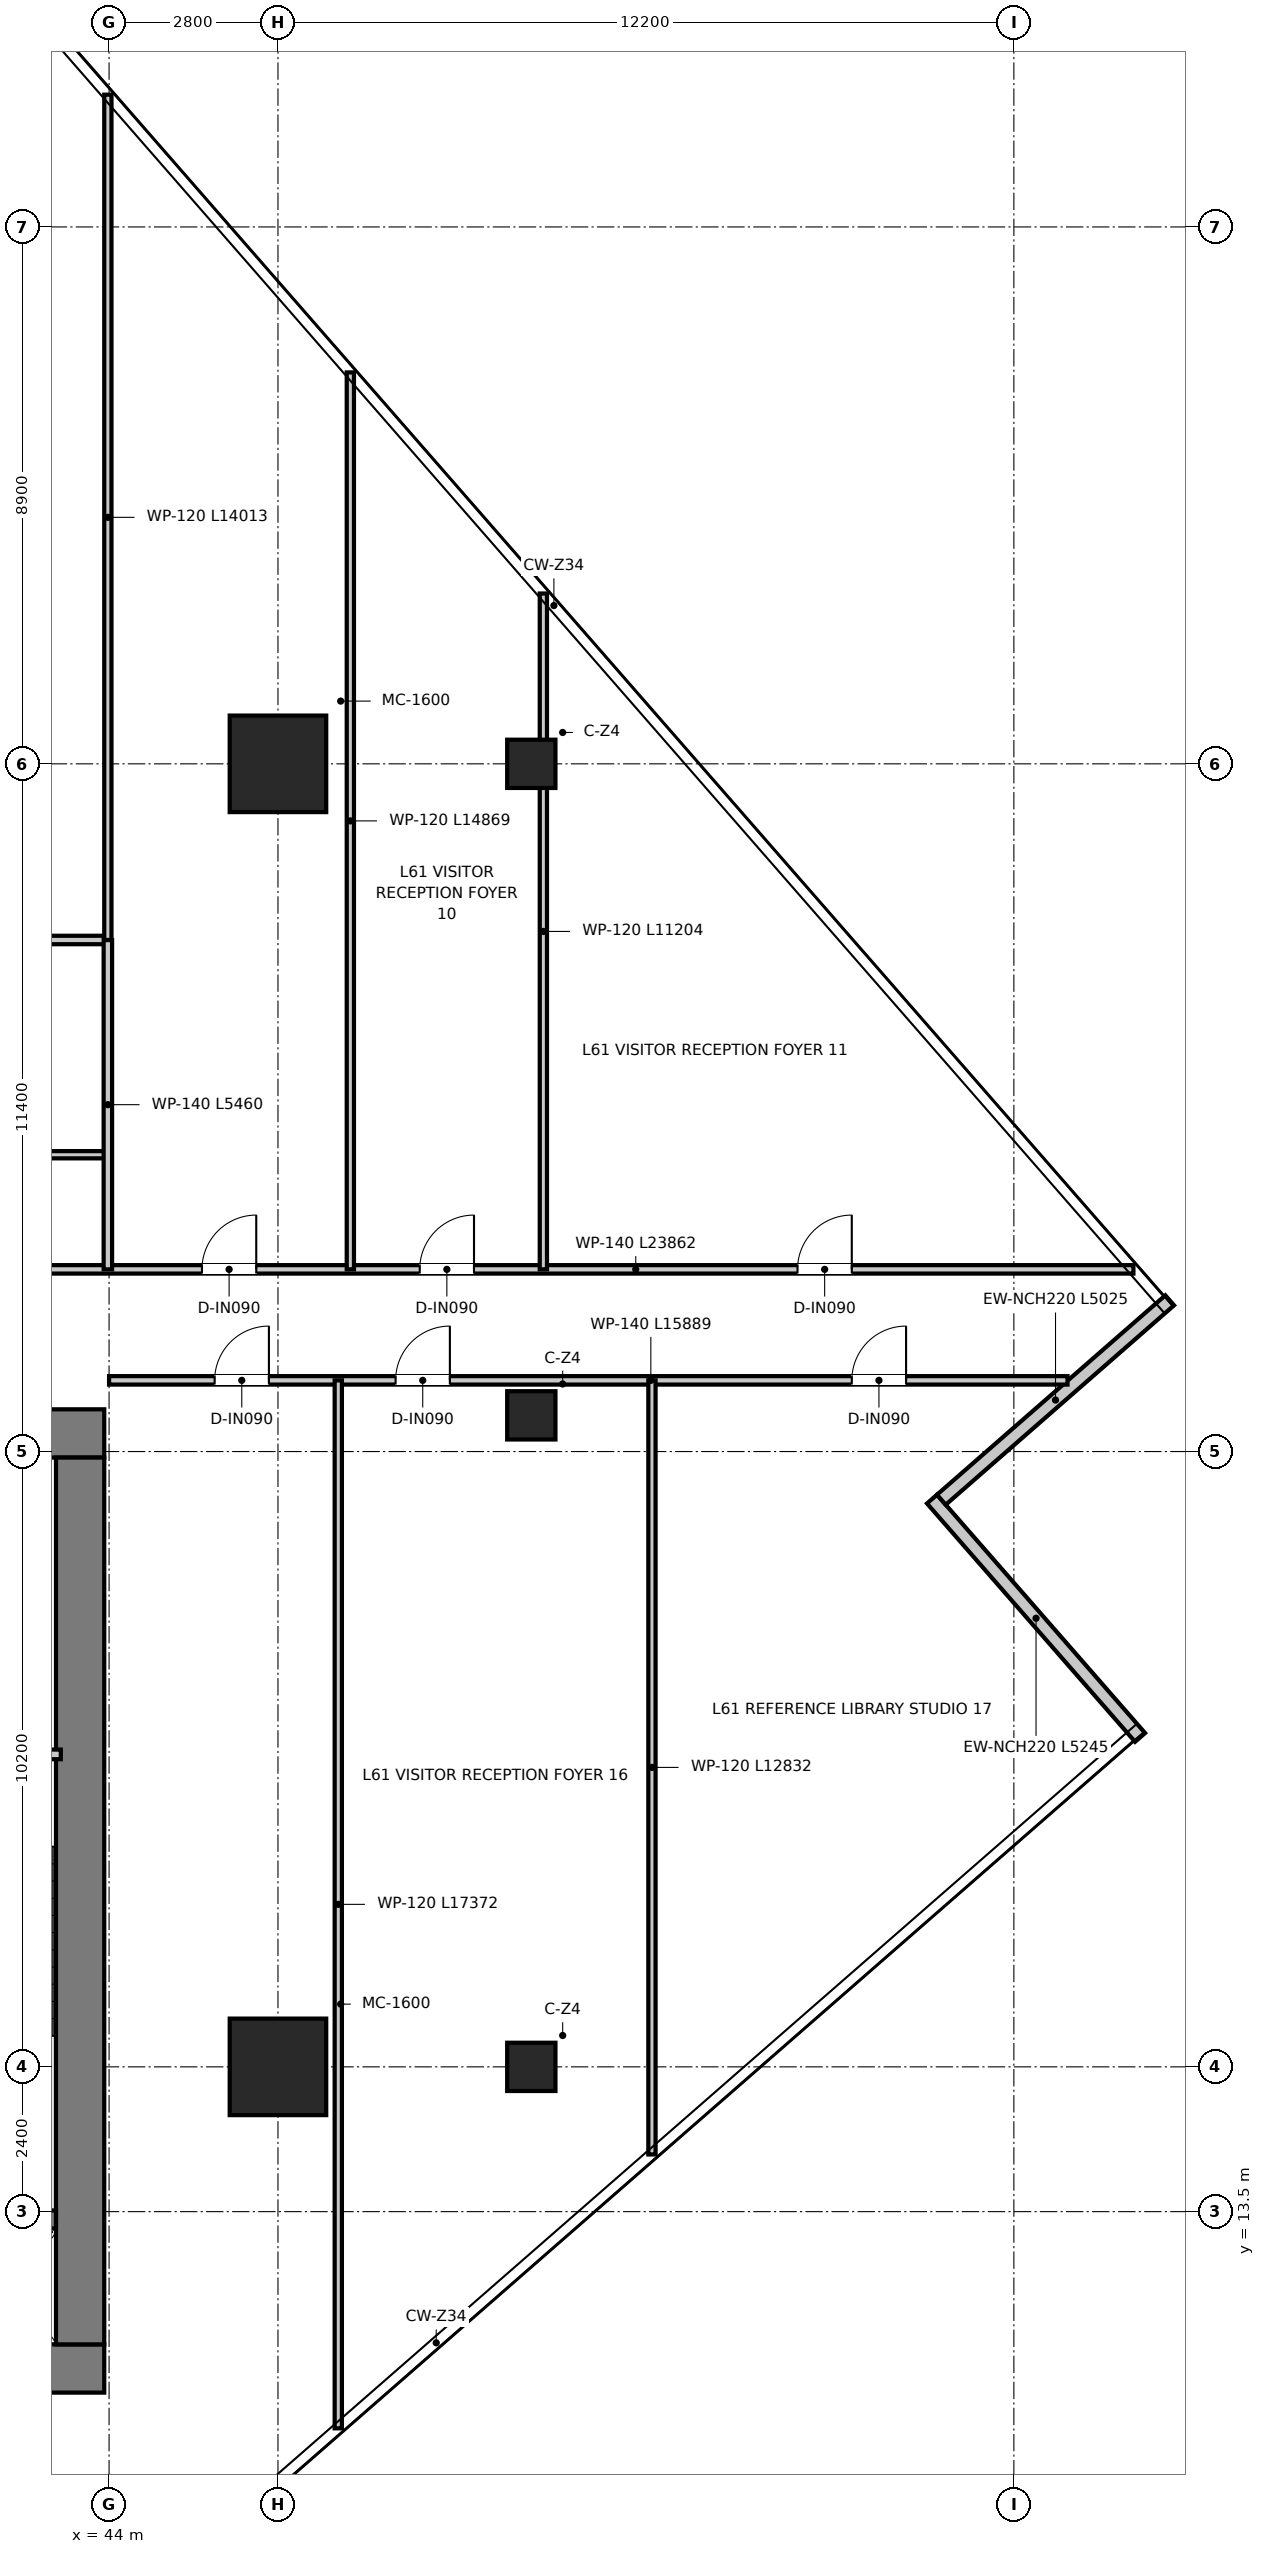
"""IFC4 building model, lengths in metres.
Left out: names, types, materials, properties, quantities, classifications, styles, units other than length and angle.
Written with IfcOpenShell. Run it as: python <this file> out.ifc"""

import sys

from ifc_helpers import new_model, si_unit, direction, frame, frame_2d, origin, origin_2d, place, context, subcontext, project, spatial, rectangle, extrude, source, transform, mapped, element, fill, save


model = new_model("IFC4")
c1 = context("Model", 3, precision=1e-05, world=origin(), true_north=direction((0.0, 1.0)))
c2 = subcontext(c1, "Body", "Model", "MODEL_VIEW")
j1 = project(units=[si_unit("LENGTHUNIT", "METRE"), si_unit("PLANEANGLEUNIT", "RADIAN")], contexts=[c1])
p1 = place(None, origin())
s1 = spatial("IfcSite", under=j1, at=p1, CompositionType="ELEMENT")
p2 = place(p1, origin())
s2 = spatial("IfcBuilding", under=s1, at=p2, CompositionType="ELEMENT")
p3 = place(p2, frame((0.0, 0.0, 250.75)))
s3 = spatial("IfcBuildingStorey", under=s2, at=p3, CompositionType="ELEMENT", Elevation=250.75)
p4 = place(p3, frame((28.08, 10.9, 0.0), z_axis=(0.0, 0.0, 1.0), x_axis=(1.0, 0.0, 0.0)))
e1 = element("IfcWall", 1, at=p4, inside=s3, PredefinedType="SHEAR", context=c2, shape_type="SweptSolid", body=[
    extrude(rectangle(XDim=15.84, YDim=0.8, at=frame_2d((7.92, 0.0))), origin(), (0.0, 0.0, 1.0), 3.95),
])
p5 = place(p3, frame((28.08, 26.4, 0.0), z_axis=(0.0, 0.0, 1.0), x_axis=(1.0, 0.0, 0.0)))
e2 = element("IfcWall", 2, at=p5, inside=s3, PredefinedType="SHEAR", context=c2, shape_type="SweptSolid", body=[
    extrude(rectangle(XDim=15.84, YDim=0.8, at=frame_2d((7.92, 0.0))), origin(), (0.0, 0.0, 1.0), 3.95),
])
p6 = place(p5, frame((7.22, 0.0, 0.0)))
e3 = element("IfcOpeningElement", 3, at=p6, cuts=e2, PredefinedType="OPENING", context=c2, shape_type="SweptSolid", body=[
    extrude(rectangle(XDim=1.4, YDim=2.2, at=frame_2d((0.7, 1.1))), frame((0.0, 0.41, 0.0), z_axis=(0.0, -1.0, 0.0), x_axis=(1.0, 0.0, 0.0)), (0.0, 0.0, 1.0), 0.82),
])
p7 = place(p5, frame((1.775, 0.0, 0.0)))
e4 = element("IfcOpeningElement", 4, at=p7, cuts=e2, PredefinedType="OPENING", context=c2, shape_type="SweptSolid", body=[
    extrude(rectangle(XDim=1.05, YDim=2.1, at=frame_2d((0.525, 1.05))), frame((0.0, 0.41, 0.0), z_axis=(0.0, -1.0, 0.0), x_axis=(1.0, 0.0, 0.0)), (0.0, 0.0, 1.0), 0.82),
])
p8 = place(p5, frame((13.015, 0.0, 0.0)))
e5 = element("IfcOpeningElement", 5, at=p8, cuts=e2, PredefinedType="OPENING", context=c2, shape_type="SweptSolid", body=[
    extrude(rectangle(XDim=1.05, YDim=2.1, at=frame_2d((0.525, 1.05))), frame((0.0, 0.41, 0.0), z_axis=(0.0, -1.0, 0.0), x_axis=(1.0, 0.0, 0.0)), (0.0, 0.0, 1.0), 0.82),
])
p9 = place(p3, frame((43.52, 11.3, 0.0), z_axis=(0.0, 0.0, 1.0), x_axis=(0.0, 1.0, 0.0)))
e6 = element("IfcWall", 6, at=p9, inside=s3, PredefinedType="SHEAR", context=c2, shape_type="SweptSolid", body=[
    extrude(rectangle(XDim=14.7, YDim=0.8, at=frame_2d((7.35, 0.0))), origin(), (0.0, 0.0, 1.0), 3.95),
])
p10 = place(p3, frame((40.02, 13.37, 0.0), z_axis=(0.0, 0.0, 1.0), x_axis=(1.0, 0.0, 0.0)))
e7 = element("IfcWall", 7, at=p10, inside=s3, PredefinedType="SHEAR", context=c2, shape_type="SweptSolid", body=[
    extrude(rectangle(XDim=3.1, YDim=0.3, at=frame_2d((1.55, 0.0))), origin(), (0.0, 0.0, 1.0), 3.95),
])
m1 = source(origin(), c2, "Body", "SweptSolid", [
    extrude(rectangle(XDim=1.6, YDim=1.6, at=origin_2d()), origin(), (0.0, 0.0, 1.0), 3.95),
])
for number, where, z_axis, x_axis in (
    (8, (46.8, 15.9, 0.0), (0.0, 0.0, 1.0), (1.0, 0.0, 0.0)),
    (9, (46.8, 37.5, 0.0), (0.0, 0.0, 1.0), (1.0, 0.0, 0.0)),
):
    element("IfcColumn", number, at=place(p3, frame(where, z_axis=z_axis, x_axis=x_axis)), inside=s3, PredefinedType="USERDEFINED", context=c2, shape_type="MappedRepresentation", body=[
        mapped(m1, transform((0.0, 0.0, 0.0), x_axis=(1.0, 0.0, 0.0), y_axis=(0.0, 1.0, 0.0), z_axis=(0.0, 0.0, 1.0), scale=1.0)),
    ])
m2 = source(origin(), c2, "Body", "SweptSolid", [
    extrude(rectangle(XDim=0.8, YDim=0.8, at=origin_2d()), origin(), (0.0, 0.0, 1.0), 3.95),
])
for number, where, z_axis, x_axis in (
    (10, (51.0, 37.5, 0.0), (0.0, 0.0, 1.0), (1.0, 0.0, 0.0)),
    (11, (51.0, 26.7, 0.0), (0.0, 0.0, 1.0), (1.0, 0.0, 0.0)),
    (12, (51.0, 15.9, 0.0), (0.0, 0.0, 1.0), (1.0, 0.0, 0.0)),
):
    element("IfcColumn", number, at=place(p3, frame(where, z_axis=z_axis, x_axis=x_axis)), inside=s3, PredefinedType="COLUMN", context=c2, shape_type="MappedRepresentation", body=[
        mapped(m2, transform((0.0, 0.0, 0.0), x_axis=(1.0, 0.0, 0.0), y_axis=(0.0, 1.0, 0.0), z_axis=(0.0, 0.0, 1.0), scale=1.0)),
    ])
p11 = place(p3, frame((61.092, 21.361, 0.0), z_axis=(0.0, 0.0, 1.0), x_axis=(-0.657710057617, 0.7532711863, 0.0)))
e13 = element("IfcWall", 13, at=p11, inside=s3, PredefinedType="ELEMENTEDWALL", context=c2, shape_type="SweptSolid", body=[
    extrude(rectangle(XDim=5.245, YDim=0.22, at=frame_2d((2.623, 0.0))), origin(), (0.0, 0.0, 1.0), 3.67),
])
p12 = place(p3, frame((57.798, 25.302, 0.0), z_axis=(0.0, 0.0, 1.0), x_axis=(0.753274531518, 0.657706226339, 0.0)))
e14 = element("IfcWall", 14, at=p12, inside=s3, PredefinedType="ELEMENTEDWALL", context=c2, shape_type="SweptSolid", body=[
    extrude(rectangle(XDim=5.025, YDim=0.22, at=frame_2d((2.512, 0.0))), origin(), (0.0, 0.0, 1.0), 3.67),
])
p13 = place(p3, frame((40.04, 21.08, 0.0), z_axis=(0.0, 0.0, 1.0), x_axis=(1.0, 0.0, 0.0)))
e15 = element("IfcWall", 15, at=p13, inside=s3, PredefinedType="PARTITIONING", context=c2, shape_type="SweptSolid", body=[
    extrude(rectangle(XDim=3.16, YDim=0.16, at=frame_2d((1.58, 0.0))), origin(), (0.0, 0.0, 1.0), 3.67),
])
p14 = place(p13, frame((1.055, 0.0, 0.0)))
e16 = element("IfcOpeningElement", 16, at=p14, cuts=e15, PredefinedType="OPENING", context=c2, shape_type="SweptSolid", body=[
    extrude(rectangle(XDim=1.05, YDim=2.1, at=frame_2d((0.525, 1.05))), frame((0.0, 0.09, 0.0), z_axis=(0.0, -1.0, 0.0), x_axis=(1.0, 0.0, 0.0)), (0.0, 0.0, 1.0), 0.18),
])
p15 = place(p3, frame((37.12, 29.12, 0.0), z_axis=(0.0, 0.0, 1.0), x_axis=(1.0, 0.0, 0.0)))
e17 = element("IfcWall", 17, at=p15, inside=s3, PredefinedType="PARTITIONING", context=c2, shape_type="SweptSolid", body=[
    extrude(rectangle(XDim=23.862, YDim=0.14, at=frame_2d((11.931, 0.0))), origin(), (0.0, 0.0, 1.0), 3.03),
])
p16 = place(p15, frame((3.03, 0.0, 0.0)))
e18 = element("IfcOpeningElement", 18, at=p16, cuts=e17, PredefinedType="OPENING", context=c2, shape_type="SweptSolid", body=[
    extrude(rectangle(XDim=0.9, YDim=2.1, at=frame_2d((0.45, 1.05))), frame((0.0, 0.08, 0.0), z_axis=(0.0, -1.0, 0.0), x_axis=(1.0, 0.0, 0.0)), (0.0, 0.0, 1.0), 0.16),
])
p17 = place(p15, frame((8.42, 0.0, 0.0)))
e19 = element("IfcOpeningElement", 19, at=p17, cuts=e17, PredefinedType="OPENING", context=c2, shape_type="SweptSolid", body=[
    extrude(rectangle(XDim=0.9, YDim=2.1, at=frame_2d((0.45, 1.05))), frame((0.0, 0.08, 0.0), z_axis=(0.0, -1.0, 0.0), x_axis=(1.0, 0.0, 0.0)), (0.0, 0.0, 1.0), 0.16),
])
p18 = place(p15, frame((12.03, 0.0, 0.0)))
e20 = element("IfcOpeningElement", 20, at=p18, cuts=e17, PredefinedType="OPENING", context=c2, shape_type="SweptSolid", body=[
    extrude(rectangle(XDim=0.9, YDim=2.1, at=frame_2d((0.45, 1.05))), frame((0.0, 0.08, 0.0), z_axis=(0.0, -1.0, 0.0), x_axis=(1.0, 0.0, 0.0)), (0.0, 0.0, 1.0), 0.16),
])
p19 = place(p15, frame((18.293, 0.0, 0.0)))
e21 = element("IfcOpeningElement", 21, at=p19, cuts=e17, PredefinedType="OPENING", context=c2, shape_type="SweptSolid", body=[
    extrude(rectangle(XDim=0.9, YDim=2.1, at=frame_2d((0.45, 1.05))), frame((0.0, 0.08, 0.0), z_axis=(0.0, -1.0, 0.0), x_axis=(1.0, 0.0, 0.0)), (0.0, 0.0, 1.0), 0.16),
])
p20 = place(p3, frame((44.0, 27.28, 0.0), z_axis=(0.0, 0.0, 1.0), x_axis=(1.0, 0.0, 0.0)))
e22 = element("IfcWall", 22, at=p20, inside=s3, PredefinedType="PARTITIONING", context=c2, shape_type="SweptSolid", body=[
    extrude(rectangle(XDim=15.889, YDim=0.14, at=frame_2d((7.944, 0.0))), origin(), (0.0, 0.0, 1.0), 3.03),
])
p21 = place(p20, frame((1.75, 0.0, 0.0)))
e23 = element("IfcOpeningElement", 23, at=p21, cuts=e22, PredefinedType="OPENING", context=c2, shape_type="SweptSolid", body=[
    extrude(rectangle(XDim=0.9, YDim=2.1, at=frame_2d((0.45, 1.05))), frame((0.0, 0.08, 0.0), z_axis=(0.0, -1.0, 0.0), x_axis=(1.0, 0.0, 0.0)), (0.0, 0.0, 1.0), 0.16),
])
p22 = place(p20, frame((4.75, 0.0, 0.0)))
e24 = element("IfcOpeningElement", 24, at=p22, cuts=e22, PredefinedType="OPENING", context=c2, shape_type="SweptSolid", body=[
    extrude(rectangle(XDim=0.9, YDim=2.1, at=frame_2d((0.45, 1.05))), frame((0.0, 0.08, 0.0), z_axis=(0.0, -1.0, 0.0), x_axis=(1.0, 0.0, 0.0)), (0.0, 0.0, 1.0), 0.16),
])
p23 = place(p20, frame((12.313, 0.0, 0.0)))
e25 = element("IfcOpeningElement", 25, at=p23, cuts=e22, PredefinedType="OPENING", context=c2, shape_type="SweptSolid", body=[
    extrude(rectangle(XDim=0.9, YDim=2.1, at=frame_2d((0.45, 1.05))), frame((0.0, 0.08, 0.0), z_axis=(0.0, -1.0, 0.0), x_axis=(1.0, 0.0, 0.0)), (0.0, 0.0, 1.0), 0.16),
])
p24 = place(p3, frame((37.12, 31.02, 0.0), z_axis=(0.0, 0.0, 1.0), x_axis=(1.0, 0.0, 0.0)))
e26 = element("IfcWall", 26, at=p24, inside=s3, PredefinedType="PARTITIONING", context=c2, shape_type="SweptSolid", body=[
    extrude(rectangle(XDim=6.86, YDim=0.12, at=frame_2d((3.43, 0.0))), origin(), (0.0, 0.0, 1.0), 3.18),
])
p25 = place(p3, frame((37.12, 34.58, 0.0), z_axis=(0.0, 0.0, 1.0), x_axis=(1.0, 0.0, 0.0)))
e27 = element("IfcWall", 27, at=p25, inside=s3, PredefinedType="PARTITIONING", context=c2, shape_type="SweptSolid", body=[
    extrude(rectangle(XDim=6.86, YDim=0.14, at=frame_2d((3.43, 0.0))), origin(), (0.0, 0.0, 1.0), 3.18),
])
p26 = place(p3, frame((43.98, 29.12, 0.0), z_axis=(0.0, 0.0, 1.0), x_axis=(0.0, 1.0, 0.0)))
e28 = element("IfcWall", 28, at=p26, inside=s3, PredefinedType="PARTITIONING", context=c2, shape_type="SweptSolid", body=[
    extrude(rectangle(XDim=5.46, YDim=0.14, at=frame_2d((2.73, 0.0))), origin(), (0.0, 0.0, 1.0), 3.37),
])
p27 = place(p3, frame((43.98, 34.58, 0.0), z_axis=(0.0, 0.0, 1.0), x_axis=(0.0, 1.0, 0.0)))
e29 = element("IfcWall", 29, at=p27, inside=s3, PredefinedType="PARTITIONING", context=c2, shape_type="SweptSolid", body=[
    extrude(rectangle(XDim=14.012, YDim=0.12, at=frame_2d((7.006, 0.0))), origin(), (0.0, 0.0, 1.0), 3.03),
])
p28 = place(p3, frame((48.0, 29.12, 0.0), z_axis=(0.0, 0.0, 1.0), x_axis=(0.0, 1.0, 0.0)))
e30 = element("IfcWall", 30, at=p28, inside=s3, PredefinedType="PARTITIONING", context=c2, shape_type="SweptSolid", body=[
    extrude(rectangle(XDim=14.868, YDim=0.12, at=frame_2d((7.434, 0.0))), origin(), (0.0, 0.0, 1.0), 3.18),
])
p29 = place(p3, frame((51.2, 29.12, 0.0), z_axis=(0.0, 0.0, 1.0), x_axis=(0.0, 1.0, 0.0)))
e31 = element("IfcWall", 31, at=p29, inside=s3, PredefinedType="PARTITIONING", context=c2, shape_type="SweptSolid", body=[
    extrude(rectangle(XDim=11.203, YDim=0.12, at=frame_2d((5.602, 0.0))), origin(), (0.0, 0.0, 1.0), 3.28),
])
p30 = place(p3, frame((47.8, 9.908, 0.0), z_axis=(0.0, 0.0, 1.0), x_axis=(0.0, 1.0, 0.0)))
e32 = element("IfcWall", 32, at=p30, inside=s3, PredefinedType="PARTITIONING", context=c2, shape_type="SweptSolid", body=[
    extrude(rectangle(XDim=17.372, YDim=0.12, at=frame_2d((8.686, 0.0))), origin(), (0.0, 0.0, 1.0), 3.18),
])
p31 = place(p3, frame((53.0, 14.448, 0.0), z_axis=(0.0, 0.0, 1.0), x_axis=(0.0, 1.0, 0.0)))
e33 = element("IfcWall", 33, at=p31, inside=s3, PredefinedType="PARTITIONING", context=c2, shape_type="SweptSolid", body=[
    extrude(rectangle(XDim=12.832, YDim=0.12, at=frame_2d((6.416, 0.0))), origin(), (0.0, 0.0, 1.0), 3.67),
])
p32 = place(p17, origin())
e34 = element("IfcDoor", 34, at=p32, inside=s3, OperationType="SINGLE_SWING_RIGHT", PredefinedType="DOOR", context=c2, shape_type="SweptSolid", body=[
    extrude(rectangle(XDim=0.9, YDim=2.1, at=frame_2d((0.45, 1.05))), frame((0.0, 0.025, 0.0), z_axis=(0.0, -1.0, 0.0), x_axis=(1.0, 0.0, 0.0)), (0.0, 0.0, 1.0), 0.05),
])
fill(e19, e34)
p33 = place(p18, origin())
e35 = element("IfcDoor", 35, at=p33, inside=s3, OperationType="SINGLE_SWING_RIGHT", PredefinedType="DOOR", context=c2, shape_type="SweptSolid", body=[
    extrude(rectangle(XDim=0.9, YDim=2.1, at=frame_2d((0.45, 1.05))), frame((0.0, 0.025, 0.0), z_axis=(0.0, -1.0, 0.0), x_axis=(1.0, 0.0, 0.0)), (0.0, 0.0, 1.0), 0.05),
])
fill(e20, e35)
p34 = place(p19, origin())
e36 = element("IfcDoor", 36, at=p34, inside=s3, OperationType="SINGLE_SWING_RIGHT", PredefinedType="DOOR", context=c2, shape_type="SweptSolid", body=[
    extrude(rectangle(XDim=0.9, YDim=2.1, at=frame_2d((0.45, 1.05))), frame((0.0, 0.025, 0.0), z_axis=(0.0, -1.0, 0.0), x_axis=(1.0, 0.0, 0.0)), (0.0, 0.0, 1.0), 0.05),
])
fill(e21, e36)
p35 = place(p21, origin())
e37 = element("IfcDoor", 37, at=p35, inside=s3, OperationType="SINGLE_SWING_RIGHT", PredefinedType="DOOR", context=c2, shape_type="SweptSolid", body=[
    extrude(rectangle(XDim=0.9, YDim=2.1, at=frame_2d((0.45, 1.05))), frame((0.0, 0.025, 0.0), z_axis=(0.0, -1.0, 0.0), x_axis=(1.0, 0.0, 0.0)), (0.0, 0.0, 1.0), 0.05),
])
fill(e23, e37)
p36 = place(p22, origin())
e38 = element("IfcDoor", 38, at=p36, inside=s3, OperationType="SINGLE_SWING_RIGHT", PredefinedType="DOOR", context=c2, shape_type="SweptSolid", body=[
    extrude(rectangle(XDim=0.9, YDim=2.1, at=frame_2d((0.45, 1.05))), frame((0.0, 0.025, 0.0), z_axis=(0.0, -1.0, 0.0), x_axis=(1.0, 0.0, 0.0)), (0.0, 0.0, 1.0), 0.05),
])
fill(e24, e38)
p37 = place(p23, origin())
e39 = element("IfcDoor", 39, at=p37, inside=s3, OperationType="SINGLE_SWING_RIGHT", PredefinedType="DOOR", context=c2, shape_type="SweptSolid", body=[
    extrude(rectangle(XDim=0.9, YDim=2.1, at=frame_2d((0.45, 1.05))), frame((0.0, 0.025, 0.0), z_axis=(0.0, -1.0, 0.0), x_axis=(1.0, 0.0, 0.0)), (0.0, 0.0, 1.0), 0.05),
])
fill(e25, e39)
save(model, sys.argv[1])
